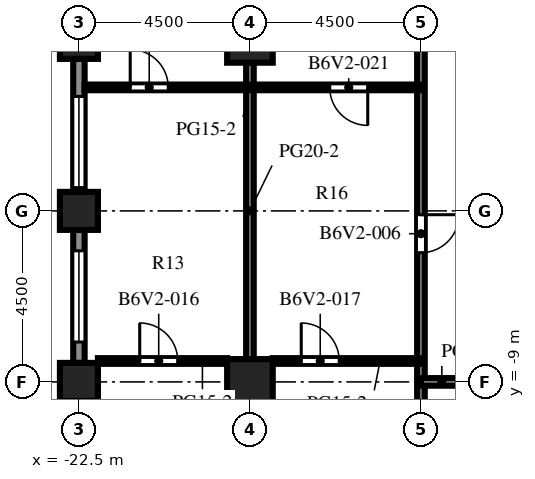
"""IFC4 building model, lengths in metres.
Left out: names, types, materials, properties, quantities, classifications, styles, units other than length and angle.
Written with IfcOpenShell. Run it as: python <this file> out.ifc"""

import sys

from ifc_helpers import new_model, si_unit, direction, frame, frame_2d, origin, origin_2d, place, context, subcontext, project, spatial, rectangle, extrude, element, fill, save


model = new_model("IFC4")
c1 = context("Model", 3, precision=1e-05, world=origin(), true_north=direction((0.0, 1.0)))
c2 = subcontext(c1, "Body", "Model", "MODEL_VIEW")
j1 = project(units=[si_unit("LENGTHUNIT", "METRE"), si_unit("PLANEANGLEUNIT", "RADIAN")], contexts=[c1])
p1 = place(None, origin())
s1 = spatial("IfcSite", under=j1, at=p1, CompositionType="ELEMENT")
p2 = place(p1, origin())
s2 = spatial("IfcBuilding", under=s1, at=p2, CompositionType="ELEMENT")
p3 = place(p2, frame((0.0, 0.0, 216.1)))
s3 = spatial("IfcBuildingStorey", under=s2, at=p3, CompositionType="ELEMENT", Elevation=216.1)
for number, where, z_axis, x_axis in (
    (1, (-22.5, -9.0, 0.0), (0.0, 0.0, 1.0), (1.0, 0.0, 0.0)),
    (2, (-22.5, -4.5, 0.0), (0.0, 0.0, 1.0), (1.0, 0.0, 0.0)),
    (3, (-22.5, 0.0, 0.0), (0.0, 0.0, 1.0), (1.0, 0.0, 0.0)),
):
    element("IfcColumn", number, at=place(p3, frame(where, z_axis=z_axis, x_axis=x_axis)), inside=s3, PredefinedType="COLUMN", context=c2, shape_type="SweptSolid", body=[
        extrude(rectangle(XDim=1.0, YDim=1.0, at=origin_2d()), origin(), (0.0, 0.0, 1.0), 4.1),
    ])
for number, where, z_axis, x_axis in (
    (4, (-18.0, -9.0, 0.0), (0.0, 0.0, 1.0), (1.0, 0.0, 0.0)),
    (5, (-18.0, 0.0, 0.0), (0.0, 0.0, 1.0), (1.0, 0.0, 0.0)),
):
    element("IfcColumn", number, at=place(p3, frame(where, z_axis=z_axis, x_axis=x_axis)), inside=s3, PredefinedType="COLUMN", context=c2, shape_type="SweptSolid", body=[
        extrude(rectangle(XDim=1.2, YDim=1.2, at=origin_2d()), origin(), (0.0, 0.0, 1.0), 4.1),
    ])
p4 = place(p3, frame((-22.5, -4.0, 0.0), z_axis=(0.0, 0.0, 1.0), x_axis=(0.0, 1.0, 0.0)))
e6 = element("IfcWall", 6, at=p4, inside=s3, PredefinedType="SOLIDWALL", context=c2, shape_type="SweptSolid", body=[
    extrude(rectangle(XDim=3.5, YDim=0.3, at=frame_2d((1.75, 0.0))), origin(), (0.0, 0.0, 1.0), 2.7),
])
p5 = place(p4, frame((0.113, 0.0, 0.8)))
e7 = element("IfcOpeningElement", 7, at=p5, cuts=e6, PredefinedType="OPENING", context=c2, shape_type="SweptSolid", body=[
    extrude(rectangle(XDim=2.4, YDim=1.7, at=frame_2d((1.2, 0.85))), frame((0.0, 0.16, 0.0), z_axis=(0.0, -1.0, 0.0), x_axis=(1.0, 0.0, 0.0)), (0.0, 0.0, 1.0), 0.32),
])
p6 = place(p3, frame((-22.5, -8.5, 0.0), z_axis=(0.0, 0.0, 1.0), x_axis=(0.0, 1.0, 0.0)))
e8 = element("IfcWall", 8, at=p6, inside=s3, PredefinedType="SOLIDWALL", context=c2, shape_type="SweptSolid", body=[
    extrude(rectangle(XDim=3.5, YDim=0.3, at=frame_2d((1.75, 0.0))), origin(), (0.0, 0.0, 1.0), 2.7),
])
p7 = place(p6, frame((0.55, 0.0, 0.8)))
e9 = element("IfcOpeningElement", 9, at=p7, cuts=e8, PredefinedType="OPENING", context=c2, shape_type="SweptSolid", body=[
    extrude(rectangle(XDim=2.4, YDim=1.7, at=frame_2d((1.2, 0.85))), frame((0.0, 0.16, 0.0), z_axis=(0.0, -1.0, 0.0), x_axis=(1.0, 0.0, 0.0)), (0.0, 0.0, 1.0), 0.32),
])
p8 = place(p3, frame((-18.0, -8.4, 0.0), z_axis=(0.0, 0.0, 1.0), x_axis=(0.0, 1.0, 0.0)))
e10 = element("IfcWall", 10, at=p8, inside=s3, PredefinedType="PARTITIONING", context=c2, shape_type="SweptSolid", body=[
    extrude(rectangle(XDim=7.8, YDim=0.2, at=frame_2d((3.9, 0.0))), origin(), (0.0, 0.0, 1.0), 3.5),
])
p9 = place(p3, frame((-13.5, -26.5, 0.0), z_axis=(0.0, 0.0, 1.0), x_axis=(0.0, 1.0, 0.0)))
e11 = element("IfcWall", 11, at=p9, inside=s3, PredefinedType="PARTITIONING", context=c2, shape_type="SweptSolid", body=[
    extrude(rectangle(XDim=29.75, YDim=0.2, at=frame_2d((14.875, 0.0))), origin(), (0.0, 0.0, 1.0), 3.5),
])
p10 = place(p9, frame((20.9, 0.0, 0.0)))
e12 = element("IfcOpeningElement", 12, at=p10, cuts=e11, PredefinedType="OPENING", context=c2, shape_type="SweptSolid", body=[
    extrude(rectangle(XDim=1.0, YDim=2.1, at=frame_2d((0.5, 1.05))), frame((0.0, 0.11, 0.0), z_axis=(0.0, -1.0, 0.0), x_axis=(1.0, 0.0, 0.0)), (0.0, 0.0, 1.0), 0.22),
])
p11 = place(p3, frame((-10.5, -9.0, 0.0), z_axis=(0.0, 0.0, 1.0), x_axis=(-1.0, 0.0, 0.0)))
e13 = element("IfcWall", 13, at=p11, inside=s3, PredefinedType="PARTITIONING", context=c2, shape_type="SweptSolid", body=[
    extrude(rectangle(XDim=3.0, YDim=0.2, at=frame_2d((1.5, 0.0))), origin(), (0.0, 0.0, 1.0), 3.5),
])
p12 = place(p11, frame((0.9, 0.0, 0.0)))
e14 = element("IfcOpeningElement", 14, at=p12, cuts=e13, PredefinedType="OPENING", context=c2, shape_type="SweptSolid", body=[
    extrude(rectangle(XDim=1.0, YDim=2.1, at=frame_2d((0.5, 1.05))), frame((0.0, 0.11, 0.0), z_axis=(0.0, -1.0, 0.0), x_axis=(1.0, 0.0, 0.0)), (0.0, 0.0, 1.0), 0.22),
])
p13 = place(p3, frame((-18.6, -8.45, 0.0), z_axis=(0.0, 0.0, 1.0), x_axis=(-1.0, 0.0, 0.0)))
e15 = element("IfcWall", 15, at=p13, inside=s3, PredefinedType="PARTITIONING", context=c2, shape_type="SweptSolid", body=[
    extrude(rectangle(XDim=3.4, YDim=0.15, at=frame_2d((1.7, 0.0))), origin(), (0.0, 0.0, 1.0), 3.5),
])
p14 = place(p13, frame((1.3, 0.0, 0.0)))
e16 = element("IfcOpeningElement", 16, at=p14, cuts=e15, PredefinedType="OPENING", context=c2, shape_type="SweptSolid", body=[
    extrude(rectangle(XDim=1.0, YDim=2.1, at=frame_2d((0.5, 1.05))), frame((0.0, 0.085, 0.0), z_axis=(0.0, -1.0, 0.0), x_axis=(1.0, 0.0, 0.0)), (0.0, 0.0, 1.0), 0.17),
])
p15 = place(p3, frame((-13.5, -8.45, 0.0), z_axis=(0.0, 0.0, 1.0), x_axis=(-1.0, 0.0, 0.0)))
e17 = element("IfcWall", 17, at=p15, inside=s3, PredefinedType="PARTITIONING", context=c2, shape_type="SweptSolid", body=[
    extrude(rectangle(XDim=3.9, YDim=0.15, at=frame_2d((1.95, 0.0))), origin(), (0.0, 0.0, 1.0), 3.5),
])
p16 = place(p15, frame((2.15, 0.0, 0.0)))
e18 = element("IfcOpeningElement", 18, at=p16, cuts=e17, PredefinedType="OPENING", context=c2, shape_type="SweptSolid", body=[
    extrude(rectangle(XDim=1.0, YDim=2.1, at=frame_2d((0.5, 1.05))), frame((0.0, 0.085, 0.0), z_axis=(0.0, -1.0, 0.0), x_axis=(1.0, 0.0, 0.0)), (0.0, 0.0, 1.0), 0.17),
])
p17 = place(p3, frame((-13.5, -1.25, 0.0), z_axis=(0.0, 0.0, 1.0), x_axis=(-1.0, 0.0, 0.0)))
e19 = element("IfcWall", 19, at=p17, inside=s3, PredefinedType="PARTITIONING", context=c2, shape_type="SweptSolid", body=[
    extrude(rectangle(XDim=8.85, YDim=0.15, at=frame_2d((4.425, 0.0))), origin(), (0.0, 0.0, 1.0), 3.5),
])
p18 = place(p17, frame((6.65, 0.0, 0.0)))
e20 = element("IfcOpeningElement", 20, at=p18, cuts=e19, PredefinedType="OPENING", context=c2, shape_type="SweptSolid", body=[
    extrude(rectangle(XDim=1.0, YDim=2.1, at=frame_2d((0.5, 1.05))), frame((0.0, 0.085, 0.0), z_axis=(0.0, -1.0, 0.0), x_axis=(1.0, 0.0, 0.0)), (0.0, 0.0, 1.0), 0.17),
])
p19 = place(p17, frame((1.4, 0.0, 0.0)))
e21 = element("IfcOpeningElement", 21, at=p19, cuts=e19, PredefinedType="OPENING", context=c2, shape_type="SweptSolid", body=[
    extrude(rectangle(XDim=1.0, YDim=2.1, at=frame_2d((0.5, 1.05))), frame((0.0, 0.085, 0.0), z_axis=(0.0, -1.0, 0.0), x_axis=(1.0, 0.0, 0.0)), (0.0, 0.0, 1.0), 0.17),
])
p20 = place(p5, origin())
e22 = element("IfcWindow", 22, at=p20, inside=s3, PartitioningType="SINGLE_PANEL", PredefinedType="WINDOW", context=c2, shape_type="SweptSolid", body=[
    extrude(rectangle(XDim=2.4, YDim=1.7, at=frame_2d((1.2, 0.85))), frame((0.0, 0.03, 0.0), z_axis=(0.0, -1.0, 0.0), x_axis=(1.0, 0.0, 0.0)), (0.0, 0.0, 1.0), 0.06),
])
fill(e7, e22)
p21 = place(p7, origin())
e23 = element("IfcWindow", 23, at=p21, inside=s3, PartitioningType="SINGLE_PANEL", PredefinedType="WINDOW", context=c2, shape_type="SweptSolid", body=[
    extrude(rectangle(XDim=2.4, YDim=1.7, at=frame_2d((1.2, 0.85))), frame((0.0, 0.03, 0.0), z_axis=(0.0, -1.0, 0.0), x_axis=(1.0, 0.0, 0.0)), (0.0, 0.0, 1.0), 0.06),
])
fill(e9, e23)
p22 = place(p10, origin())
e24 = element("IfcDoor", 24, at=p22, inside=s3, OperationType="SINGLE_SWING_RIGHT", PredefinedType="DOOR", context=c2, shape_type="SweptSolid", body=[
    extrude(rectangle(XDim=1.0, YDim=2.1, at=frame_2d((0.5, 1.05))), frame((0.0, 0.025, 0.0), z_axis=(0.0, -1.0, 0.0), x_axis=(1.0, 0.0, 0.0)), (0.0, 0.0, 1.0), 0.05),
])
fill(e12, e24)
p23 = place(p14, origin())
e25 = element("IfcDoor", 25, at=p23, inside=s3, OperationType="SINGLE_SWING_RIGHT", PredefinedType="DOOR", context=c2, shape_type="SweptSolid", body=[
    extrude(rectangle(XDim=1.0, YDim=2.1, at=frame_2d((0.5, 1.05))), frame((0.0, 0.025, 0.0), z_axis=(0.0, -1.0, 0.0), x_axis=(1.0, 0.0, 0.0)), (0.0, 0.0, 1.0), 0.05),
])
fill(e16, e25)
p24 = place(p16, origin())
e26 = element("IfcDoor", 26, at=p24, inside=s3, OperationType="SINGLE_SWING_RIGHT", PredefinedType="DOOR", context=c2, shape_type="SweptSolid", body=[
    extrude(rectangle(XDim=1.0, YDim=2.1, at=frame_2d((0.5, 1.05))), frame((0.0, 0.025, 0.0), z_axis=(0.0, -1.0, 0.0), x_axis=(1.0, 0.0, 0.0)), (0.0, 0.0, 1.0), 0.05),
])
fill(e18, e26)
p25 = place(p18, origin())
e27 = element("IfcDoor", 27, at=p25, inside=s3, OperationType="SINGLE_SWING_RIGHT", PredefinedType="DOOR", context=c2, shape_type="SweptSolid", body=[
    extrude(rectangle(XDim=1.0, YDim=2.1, at=frame_2d((0.5, 1.05))), frame((0.0, 0.025, 0.0), z_axis=(0.0, -1.0, 0.0), x_axis=(1.0, 0.0, 0.0)), (0.0, 0.0, 1.0), 0.05),
])
fill(e20, e27)
p26 = place(p19, origin())
e28 = element("IfcDoor", 28, at=p26, inside=s3, OperationType="SINGLE_SWING_LEFT", PredefinedType="DOOR", context=c2, shape_type="SweptSolid", body=[
    extrude(rectangle(XDim=1.0, YDim=2.1, at=frame_2d((0.5, 1.05))), frame((0.0, 0.025, 0.0), z_axis=(0.0, -1.0, 0.0), x_axis=(1.0, 0.0, 0.0)), (0.0, 0.0, 1.0), 0.05),
])
fill(e21, e28)
save(model, sys.argv[1])
